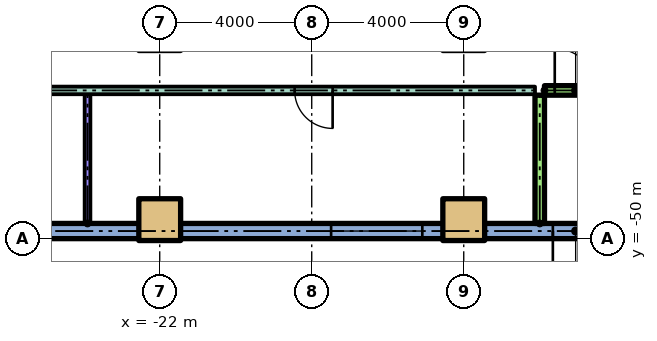
"""IFC4 building model, lengths in metres.
Left out: names, types, materials, properties, quantities, classifications, styles, units other than length and angle.
Written with IfcOpenShell. Run it as: python <this file> out.ifc"""

import sys

from ifc_helpers import new_model, si_unit, direction, frame, frame_2d, origin, origin_2d, place, context, subcontext, project, spatial, rectangle, extrude, element, fill, save


model = new_model("IFC4")
c1 = context("Model", 3, precision=1e-05, world=origin(), true_north=direction((0.0, 1.0)))
c2 = subcontext(c1, "Body", "Model", "MODEL_VIEW")
j1 = project(units=[si_unit("LENGTHUNIT", "METRE"), si_unit("PLANEANGLEUNIT", "RADIAN")], contexts=[c1])
p1 = place(None, origin())
s1 = spatial("IfcSite", under=j1, at=p1, CompositionType="ELEMENT")
p2 = place(p1, origin())
s2 = spatial("IfcBuilding", under=s1, at=p2, CompositionType="ELEMENT")
p3 = place(p2, origin())
s3 = spatial("IfcBuildingStorey", under=s2, at=p3, CompositionType="ELEMENT", Elevation=0.0)
for number, where in (
    (1, (-22.0, -49.5, 0.0)),
    (2, (-14.0, -49.5, 0.0)),
):
    element("IfcColumn", number, at=place(p3, frame(where)), inside=s3, PredefinedType="COLUMN", context=c2, shape_type="SweptSolid", body=[
        extrude(rectangle(XDim=1.1, YDim=1.1, at=origin_2d()), origin(), (0.0, 0.0, 1.0), 6.0),
    ])
p4 = place(p3, frame((-39.6, -49.8, 0.0)))
e3 = element("IfcWall", 3, at=p4, inside=s3, PredefinedType="STANDARD", context=c2, shape_type="SweptSolid", body=[
    extrude(rectangle(XDim=79.2, YDim=0.4, at=frame_2d((39.6, 0.0))), origin(), (0.0, 0.0, 1.0), 5.7),
])
p5 = place(p4, frame((11.2, 0.0, 0.0)))
e4 = element("IfcOpeningElement", 4, at=p5, cuts=e3, PredefinedType="OPENING", context=c2, shape_type="SweptSolid", body=[
    extrude(rectangle(XDim=1.8, YDim=2.4, at=frame_2d((0.9, 1.2))), frame((0.0, 0.21, 0.0), z_axis=(0.0, -1.0, 0.0), x_axis=(1.0, 0.0, 0.0)), (0.0, 0.0, 1.0), 0.42),
])
p6 = place(p4, frame((38.11, 0.0, 0.0)))
e5 = element("IfcOpeningElement", 5, at=p6, cuts=e3, PredefinedType="OPENING", context=c2, shape_type="SweptSolid", body=[
    extrude(rectangle(XDim=2.4, YDim=2.4, at=frame_2d((1.2, 1.2))), frame((0.0, 0.21, 0.0), z_axis=(0.0, -1.0, 0.0), x_axis=(1.0, 0.0, 0.0)), (0.0, 0.0, 1.0), 0.42),
])
p7 = place(p4, frame((54.41, 0.0, 0.0)))
e6 = element("IfcOpeningElement", 6, at=p7, cuts=e3, PredefinedType="OPENING", context=c2, shape_type="SweptSolid", body=[
    extrude(rectangle(XDim=1.8, YDim=2.4, at=frame_2d((0.9, 1.2))), frame((0.0, 0.21, 0.0), z_axis=(0.0, -1.0, 0.0), x_axis=(1.0, 0.0, 0.0)), (0.0, 0.0, 1.0), 0.42),
])
p8 = place(p4, frame((22.11, 0.0, 0.9)))
e7 = element("IfcOpeningElement", 7, at=p8, cuts=e3, PredefinedType="OPENING", context=c2, shape_type="SweptSolid", body=[
    extrude(rectangle(XDim=2.4, YDim=2.4, at=frame_2d((1.2, 1.2))), frame((0.0, 0.21, 0.0), z_axis=(0.0, -1.0, 0.0), x_axis=(1.0, 0.0, 0.0)), (0.0, 0.0, 1.0), 0.42),
])
p9 = place(p4, frame((30.11, 0.0, 0.9)))
e8 = element("IfcOpeningElement", 8, at=p9, cuts=e3, PredefinedType="OPENING", context=c2, shape_type="SweptSolid", body=[
    extrude(rectangle(XDim=2.075, YDim=2.4, at=frame_2d((1.038, 1.2))), frame((0.0, 0.21, 0.0), z_axis=(0.0, -1.0, 0.0), x_axis=(1.0, 0.0, 0.0)), (0.0, 0.0, 1.0), 0.42),
])
p10 = place(p4, frame((47.015, 0.0, 0.9)))
e9 = element("IfcOpeningElement", 9, at=p10, cuts=e3, PredefinedType="OPENING", context=c2, shape_type="SweptSolid", body=[
    extrude(rectangle(XDim=1.495, YDim=2.4, at=frame_2d((0.748, 1.2))), frame((0.0, 0.21, 0.0), z_axis=(0.0, -1.0, 0.0), x_axis=(1.0, 0.0, 0.0)), (0.0, 0.0, 1.0), 0.42),
])
p11 = place(p4, frame((6.305, 0.0, 0.0)))
e10 = element("IfcOpeningElement", 10, at=p11, cuts=e3, PredefinedType="OPENING", context=c2, shape_type="SweptSolid", body=[
    extrude(rectangle(XDim=1.2, YDim=2.1, at=frame_2d((0.6, 1.05))), frame((0.0, 0.21, 0.0), z_axis=(0.0, -1.0, 0.0), x_axis=(1.0, 0.0, 0.0)), (0.0, 0.0, 1.0), 0.42),
])
p12 = place(p4, frame((71.845, 0.0, 0.0)))
e11 = element("IfcOpeningElement", 11, at=p12, cuts=e3, PredefinedType="OPENING", context=c2, shape_type="SweptSolid", body=[
    extrude(rectangle(XDim=1.2, YDim=2.1, at=frame_2d((0.6, 1.05))), frame((0.0, 0.21, 0.0), z_axis=(0.0, -1.0, 0.0), x_axis=(1.0, 0.0, 0.0)), (0.0, 0.0, 1.0), 0.42),
])
p13 = place(p4, frame((27.945, 0.0, 0.0)))
e12 = element("IfcOpeningElement", 12, at=p13, cuts=e3, PredefinedType="OPENING", context=c2, shape_type="SweptSolid", body=[
    extrude(rectangle(XDim=1.2, YDim=2.1, at=frame_2d((0.6, 1.05))), frame((0.0, 0.21, 0.0), z_axis=(0.0, -1.0, 0.0), x_axis=(1.0, 0.0, 0.0)), (0.0, 0.0, 1.0), 0.42),
])
p14 = place(p4, frame((50.205, 0.0, 0.0)))
e13 = element("IfcOpeningElement", 13, at=p14, cuts=e3, PredefinedType="OPENING", context=c2, shape_type="SweptSolid", body=[
    extrude(rectangle(XDim=1.2, YDim=2.1, at=frame_2d((0.6, 1.05))), frame((0.0, 0.21, 0.0), z_axis=(0.0, -1.0, 0.0), x_axis=(1.0, 0.0, 0.0)), (0.0, 0.0, 1.0), 0.42),
])
p15 = place(p3, frame((-31.775, -46.1, 0.0)))
e14 = element("IfcWall", 14, at=p15, inside=s3, PredefinedType="PARTITIONING", context=c2, shape_type="SweptSolid", body=[
    extrude(rectangle(XDim=19.65, YDim=0.2, at=frame_2d((9.825, 0.0))), origin(), (0.0, 0.0, 1.0), 5.7),
])
p16 = place(p15, frame((3.375, 0.0, 0.0)))
e15 = element("IfcOpeningElement", 15, at=p16, cuts=e14, PredefinedType="OPENING", context=c2, shape_type="SweptSolid", body=[
    extrude(rectangle(XDim=1.0, YDim=2.1, at=frame_2d((0.5, 1.05))), frame((0.0, 0.11, 0.0), z_axis=(0.0, -1.0, 0.0), x_axis=(1.0, 0.0, 0.0)), (0.0, 0.0, 1.0), 0.22),
])
p17 = place(p15, frame((13.325, 0.0, 0.0)))
e16 = element("IfcOpeningElement", 16, at=p17, cuts=e14, PredefinedType="OPENING", context=c2, shape_type="SweptSolid", body=[
    extrude(rectangle(XDim=1.0, YDim=2.1, at=frame_2d((0.5, 1.05))), frame((0.0, 0.11, 0.0), z_axis=(0.0, -1.0, 0.0), x_axis=(1.0, 0.0, 0.0)), (0.0, 0.0, 1.0), 0.22),
])
p18 = place(p3, frame((-11.875, -46.1, 0.0)))
e17 = element("IfcWall", 17, at=p18, inside=s3, PredefinedType="SOLIDWALL", context=c2, shape_type="SweptSolid", body=[
    extrude(rectangle(XDim=7.75, YDim=0.25, at=frame_2d((3.875, 0.0))), origin(), (0.0, 0.0, 1.0), 5.7),
])
p19 = place(p18, frame((0.27, 0.0, 0.0)))
e18 = element("IfcOpeningElement", 18, at=p19, cuts=e17, PredefinedType="OPENING", context=c2, shape_type="SweptSolid", body=[
    extrude(rectangle(XDim=1.1, YDim=2.1, at=frame_2d((0.55, 1.05))), frame((0.0, 0.135, 0.0), z_axis=(0.0, -1.0, 0.0), x_axis=(1.0, 0.0, 0.0)), (0.0, 0.0, 1.0), 0.27),
])
p20 = place(p3, frame((-23.9, -49.6, 0.0), z_axis=(0.0, 0.0, 1.0), x_axis=(0.0, 1.0, 0.0)))
e19 = element("IfcWall", 19, at=p20, inside=s3, PredefinedType="PARTITIONING", context=c2, shape_type="SweptSolid", body=[
    extrude(rectangle(XDim=3.4, YDim=0.15, at=frame_2d((1.7, 0.0))), origin(), (0.0, 0.0, 1.0), 5.7),
])
p21 = place(p3, frame((-12.0, -49.6, 0.0), z_axis=(0.0, 0.0, 1.0), x_axis=(0.0, 1.0, 0.0)))
e20 = element("IfcWall", 20, at=p21, inside=s3, PredefinedType="SOLIDWALL", context=c2, shape_type="SweptSolid", body=[
    extrude(rectangle(XDim=3.375, YDim=0.25, at=frame_2d((1.688, 0.0))), origin(), (0.0, 0.0, 1.0), 5.7),
])
p22 = place(p8, origin())
e21 = element("IfcWindow", 21, at=p22, inside=s3, PartitioningType="SINGLE_PANEL", PredefinedType="WINDOW", context=c2, shape_type="SweptSolid", body=[
    extrude(rectangle(XDim=2.4, YDim=2.4, at=frame_2d((1.2, 1.2))), frame((0.0, 0.03, 0.0), z_axis=(0.0, -1.0, 0.0), x_axis=(1.0, 0.0, 0.0)), (0.0, 0.0, 1.0), 0.06),
])
fill(e7, e21)
p23 = place(p17, frame((1.0, 0.0, 0.0), z_axis=(0.0, 0.0, 1.0), x_axis=(-1.0, 0.0, 0.0)))
e22 = element("IfcDoor", 22, at=p23, inside=s3, OperationType="SINGLE_SWING_RIGHT", PredefinedType="DOOR", context=c2, shape_type="SweptSolid", body=[
    extrude(rectangle(XDim=1.0, YDim=2.1, at=frame_2d((0.5, 1.05))), frame((0.0, 0.025, 0.0), z_axis=(0.0, -1.0, 0.0), x_axis=(1.0, 0.0, 0.0)), (0.0, 0.0, 1.0), 0.05),
])
fill(e16, e22)
p24 = place(p19, origin())
e23 = element("IfcDoor", 23, at=p24, inside=s3, OperationType="SINGLE_SWING_LEFT", PredefinedType="DOOR", context=c2, shape_type="SweptSolid", body=[
    extrude(rectangle(XDim=1.1, YDim=2.1, at=frame_2d((0.55, 1.05))), frame((0.0, 0.025, 0.0), z_axis=(0.0, -1.0, 0.0), x_axis=(1.0, 0.0, 0.0)), (0.0, 0.0, 1.0), 0.05),
])
fill(e18, e23)
p25 = place(p13, frame((1.2, 0.0, 0.0), z_axis=(0.0, 0.0, 1.0), x_axis=(-1.0, 0.0, 0.0)))
e24 = element("IfcDoor", 24, at=p25, inside=s3, OperationType="SINGLE_SWING_LEFT", PredefinedType="DOOR", context=c2, shape_type="SweptSolid", body=[
    extrude(rectangle(XDim=1.2, YDim=2.1, at=frame_2d((0.6, 1.05))), frame((0.0, 0.025, 0.0), z_axis=(0.0, -1.0, 0.0), x_axis=(1.0, 0.0, 0.0)), (0.0, 0.0, 1.0), 0.05),
])
fill(e12, e24)
save(model, sys.argv[1])
